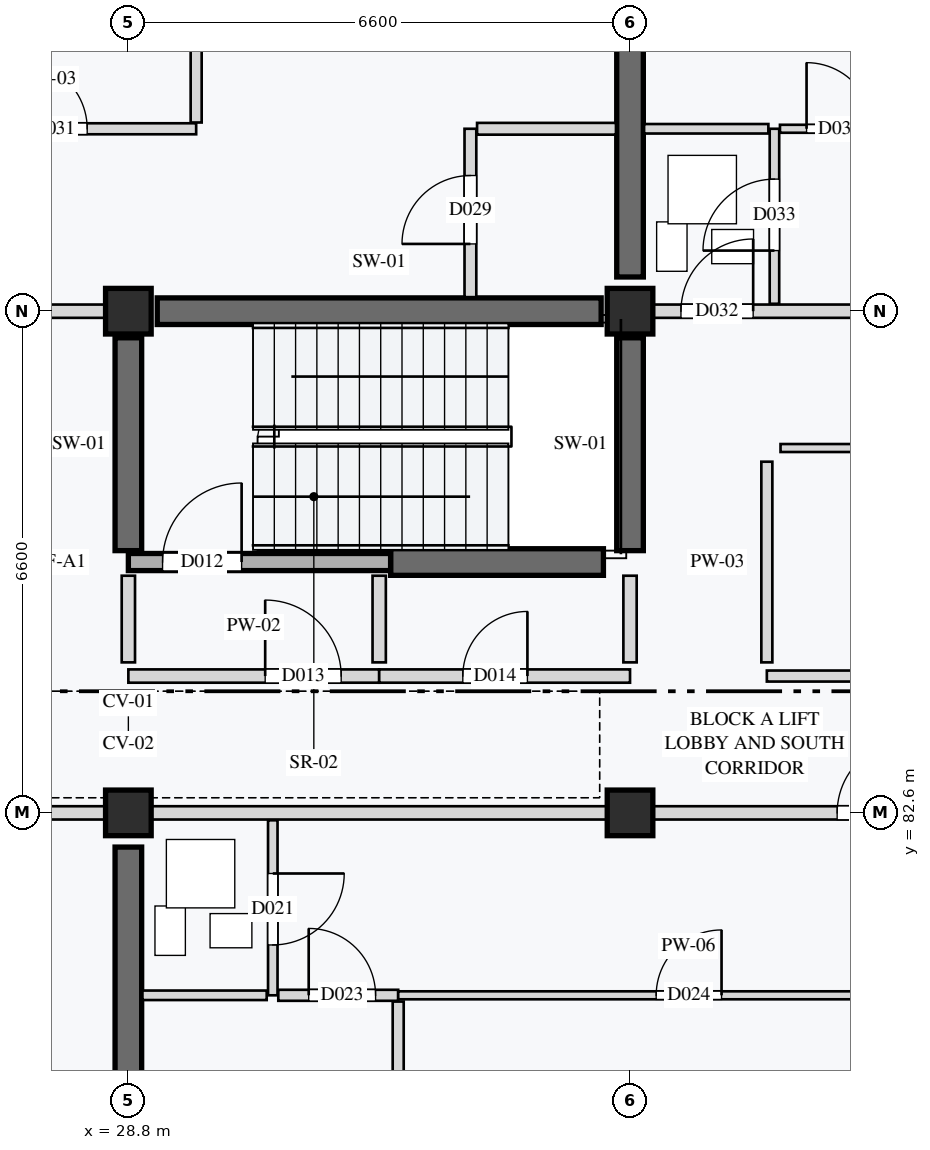
"""IFC4 building model, lengths in metres.
Left out: names, types, materials, properties, quantities, classifications, styles, units other than length and angle.
Written with IfcOpenShell. Run it as: python <this file> out.ifc"""

import sys

from ifc_helpers import new_model, si_unit, direction, frame, frame_2d, origin, origin_2d, place, context, subcontext, project, spatial, rectangle, extrude, element, fill, save


model = new_model("IFC4")
c1 = context("Model", 3, precision=1e-05, world=origin(), true_north=direction((0.0, 1.0)))
c2 = subcontext(c1, "Body", "Model", "MODEL_VIEW")
j1 = project(units=[si_unit("LENGTHUNIT", "METRE"), si_unit("PLANEANGLEUNIT", "RADIAN")], contexts=[c1])
p1 = place(None, origin())
s1 = spatial("IfcSite", under=j1, at=p1, CompositionType="ELEMENT")
p2 = place(p1, origin())
s2 = spatial("IfcBuilding", under=s1, at=p2, CompositionType="ELEMENT")
p3 = place(p2, origin())
s3 = spatial("IfcBuildingStorey", under=s2, at=p3, CompositionType="ELEMENT", Elevation=0.0)
for number, where, z_axis, x_axis in (
    (1, (28.8, 82.6, 0.0), (0.0, 0.0, 1.0), (1.0, 0.0, 0.0)),
    (2, (28.8, 89.2, 0.0), (0.0, 0.0, 1.0), (1.0, 0.0, 0.0)),
    (3, (35.4, 82.6, 0.0), (0.0, 0.0, 1.0), (1.0, 0.0, 0.0)),
    (4, (35.4, 89.2, 0.0), (0.0, 0.0, 1.0), (1.0, 0.0, 0.0)),
):
    element("IfcColumn", number, at=place(p3, frame(where, z_axis=z_axis, x_axis=x_axis)), inside=s3, PredefinedType="COLUMN", context=c2, shape_type="SweptSolid", body=[
        extrude(rectangle(XDim=0.6, YDim=0.6, at=origin_2d()), origin(), (0.0, 0.0, 1.0), 4.2),
    ])
p4 = place(p3, frame((29.18, 89.2, 0.0), z_axis=(0.0, 0.0, 1.0), x_axis=(1.0, 0.0, 0.0)))
e5 = element("IfcWall", 5, at=p4, inside=s3, PredefinedType="SHEAR", context=c2, shape_type="SweptSolid", body=[
    extrude(rectangle(XDim=5.84, YDim=0.35, at=frame_2d((2.92, 0.0))), origin(), (0.0, 0.0, 1.0), 3.92),
])
for number, where, z_axis, x_axis in (
    (6, (32.25, 85.9, 0.0), (0.0, 0.0, 1.0), (1.0, 0.0, 0.0)),
    (7, (28.8, 86.05, 0.0), (0.0, 0.0, 1.0), (0.0, 1.0, 0.0)),
    (8, (35.4, 86.05, 0.0), (0.0, 0.0, 1.0), (0.0, 1.0, 0.0)),
):
    element("IfcWall", number, at=place(p3, frame(where, z_axis=z_axis, x_axis=x_axis)), inside=s3, PredefinedType="SHEAR", context=c2, shape_type="SweptSolid", body=[
        extrude(rectangle(XDim=2.8, YDim=0.35, at=frame_2d((1.4, 0.0))), origin(), (0.0, 0.0, 1.0), 3.92),
    ])
p5 = place(p3, frame((28.8, 76.45, 0.0), z_axis=(0.0, 0.0, 1.0), x_axis=(0.0, 1.0, 0.0)))
e9 = element("IfcWall", 9, at=p5, inside=s3, PredefinedType="SHEAR", context=c2, shape_type="SweptSolid", body=[
    extrude(rectangle(XDim=5.7, YDim=0.35, at=frame_2d((2.85, 0.0))), origin(), (0.0, 0.0, 1.0), 3.92),
])
p6 = place(p3, frame((35.4, 89.65, 0.0), z_axis=(0.0, 0.0, 1.0), x_axis=(0.0, 1.0, 0.0)))
e10 = element("IfcWall", 10, at=p6, inside=s3, PredefinedType="SHEAR", context=c2, shape_type="SweptSolid", body=[
    extrude(rectangle(XDim=5.7, YDim=0.35, at=frame_2d((2.85, 0.0))), origin(), (0.0, 0.0, 1.0), 3.92),
])
p7 = place(p3, frame((28.8, 85.9, 0.0), z_axis=(0.0, 0.0, 1.0), x_axis=(1.0, 0.0, 0.0)))
e11 = element("IfcWall", 11, at=p7, inside=s3, PredefinedType="STANDARD", context=c2, shape_type="SweptSolid", body=[
    extrude(rectangle(XDim=3.45, YDim=0.225, at=frame_2d((1.725, 0.0))), origin(), (0.0, 0.0, 1.0), 3.92),
])
p8 = place(p7, frame((0.45, 0.0, 0.0)))
e12 = element("IfcOpeningElement", 12, at=p8, cuts=e11, PredefinedType="OPENING", context=c2, shape_type="SweptSolid", body=[
    extrude(rectangle(XDim=1.04, YDim=2.12, at=frame_2d((0.52, 1.06))), frame((0.0, 0.123, 0.0), z_axis=(0.0, -1.0, 0.0), x_axis=(1.0, 0.0, 0.0)), (0.0, 0.0, 1.0), 0.245),
])
p9 = place(p3, frame((28.8, 84.4, 0.0), z_axis=(0.0, 0.0, 1.0), x_axis=(1.0, 0.0, 0.0)))
e13 = element("IfcWall", 13, at=p9, inside=s3, PredefinedType="PARTITIONING", context=c2, shape_type="SweptSolid", body=[
    extrude(rectangle(XDim=3.3, YDim=0.175, at=frame_2d((1.65, 0.0))), origin(), (0.0, 0.0, 1.0), 3.92),
])
p10 = place(p9, frame((1.8, 0.0, 0.0)))
e14 = element("IfcOpeningElement", 14, at=p10, cuts=e13, PredefinedType="OPENING", context=c2, shape_type="SweptSolid", body=[
    extrude(rectangle(XDim=1.0, YDim=2.1, at=frame_2d((0.5, 1.05))), frame((0.0, 0.097, 0.0), z_axis=(0.0, -1.0, 0.0), x_axis=(1.0, 0.0, 0.0)), (0.0, 0.0, 1.0), 0.195),
])
p11 = place(p3, frame((32.1, 84.4, 0.0), z_axis=(0.0, 0.0, 1.0), x_axis=(1.0, 0.0, 0.0)))
e15 = element("IfcWall", 15, at=p11, inside=s3, PredefinedType="PARTITIONING", context=c2, shape_type="SweptSolid", body=[
    extrude(rectangle(XDim=3.3, YDim=0.175, at=frame_2d((1.65, 0.0))), origin(), (0.0, 0.0, 1.0), 3.92),
])
p12 = place(p11, frame((1.1, 0.0, 0.0)))
e16 = element("IfcOpeningElement", 16, at=p12, cuts=e15, PredefinedType="OPENING", context=c2, shape_type="SweptSolid", body=[
    extrude(rectangle(XDim=0.85, YDim=2.0, at=frame_2d((0.425, 1.0))), frame((0.0, 0.097, 0.0), z_axis=(0.0, -1.0, 0.0), x_axis=(1.0, 0.0, 0.0)), (0.0, 0.0, 1.0), 0.195),
])
p13 = place(p3, frame((28.8, 84.58, 0.0), z_axis=(0.0, 0.0, 1.0), x_axis=(0.0, 1.0, 0.0)))
e17 = element("IfcWall", 17, at=p13, inside=s3, PredefinedType="PARTITIONING", context=c2, shape_type="SweptSolid", body=[
    extrude(rectangle(XDim=1.14, YDim=0.175, at=frame_2d((0.57, 0.0))), origin(), (0.0, 0.0, 1.0), 3.75),
])
for number, where, z_axis, x_axis in (
    (18, (32.1, 84.58, 0.0), (0.0, 0.0, 1.0), (0.0, 1.0, 0.0)),
    (19, (35.4, 84.58, 0.0), (0.0, 0.0, 1.0), (0.0, 1.0, 0.0)),
):
    element("IfcWall", number, at=place(p3, frame(where, z_axis=z_axis, x_axis=x_axis)), inside=s3, PredefinedType="PARTITIONING", context=c2, shape_type="SweptSolid", body=[
        extrude(rectangle(XDim=1.14, YDim=0.175, at=frame_2d((0.57, 0.0))), origin(), (0.0, 0.0, 1.0), 3.92),
    ])
p14 = place(p3, frame((37.2, 84.4, 0.0), z_axis=(0.0, 0.0, 1.0), x_axis=(1.0, 0.0, 0.0)))
e20 = element("IfcWall", 20, at=p14, inside=s3, PredefinedType="PARTITIONING", context=c2, shape_type="SweptSolid", body=[
    extrude(rectangle(XDim=6.0, YDim=0.145, at=frame_2d((3.0, 0.0))), origin(), (0.0, 0.0, 1.0), 3.92),
])
p15 = place(p14, frame((1.6, 0.0, 0.0)))
e21 = element("IfcOpeningElement", 21, at=p15, cuts=e20, PredefinedType="OPENING", context=c2, shape_type="SweptSolid", body=[
    extrude(rectangle(XDim=0.87, YDim=2.08, at=frame_2d((0.435, 1.04))), frame((0.0, 0.083, 0.0), z_axis=(0.0, -1.0, 0.0), x_axis=(1.0, 0.0, 0.0)), (0.0, 0.0, 1.0), 0.165),
])
p16 = place(p3, frame((37.38, 87.4, 0.0), z_axis=(0.0, 0.0, 1.0), x_axis=(1.0, 0.0, 0.0)))
e22 = element("IfcWall", 22, at=p16, inside=s3, PredefinedType="PARTITIONING", context=c2, shape_type="SweptSolid", body=[
    extrude(rectangle(XDim=11.2, YDim=0.105, at=frame_2d((5.6, 0.0))), origin(), (0.0, 0.0, 1.0), 3.92),
])
p17 = place(p3, frame((37.2, 84.58, 0.0), z_axis=(0.0, 0.0, 1.0), x_axis=(0.0, 1.0, 0.0)))
e23 = element("IfcWall", 23, at=p17, inside=s3, PredefinedType="PARTITIONING", context=c2, shape_type="SweptSolid", body=[
    extrude(rectangle(XDim=2.64, YDim=0.145, at=frame_2d((1.32, 0.0))), origin(), (0.0, 0.0, 1.0), 3.92),
])
p18 = place(p3, frame((22.2, 82.6, 0.0), z_axis=(0.0, 0.0, 1.0), x_axis=(1.0, 0.0, 0.0)))
e24 = element("IfcWall", 24, at=p18, inside=s3, PredefinedType="PARTITIONING", context=c2, shape_type="SweptSolid", body=[
    extrude(rectangle(XDim=6.6, YDim=0.175, at=frame_2d((3.3, 0.0))), origin(), (0.0, 0.0, 1.0), 3.55),
])
p19 = place(p18, frame((2.4, 0.0, 0.0)))
e25 = element("IfcOpeningElement", 25, at=p19, cuts=e24, PredefinedType="OPENING", context=c2, shape_type="SweptSolid", body=[
    extrude(rectangle(XDim=1.6, YDim=2.2, at=frame_2d((0.8, 1.1))), frame((0.0, 0.097, 0.0), z_axis=(0.0, -1.0, 0.0), x_axis=(1.0, 0.0, 0.0)), (0.0, 0.0, 1.0), 0.195),
])
p20 = place(p3, frame((28.8, 82.6, 0.0), z_axis=(0.0, 0.0, 1.0), x_axis=(1.0, 0.0, 0.0)))
e26 = element("IfcWall", 26, at=p20, inside=s3, PredefinedType="PARTITIONING", context=c2, shape_type="SweptSolid", body=[
    extrude(rectangle(XDim=19.8, YDim=0.175, at=frame_2d((9.9, 0.0))), origin(), (0.0, 0.0, 1.0), 3.55),
])
p21 = place(p20, frame((9.325, 0.0, 0.0)))
e27 = element("IfcOpeningElement", 27, at=p21, cuts=e26, PredefinedType="OPENING", context=c2, shape_type="SweptSolid", body=[
    extrude(rectangle(XDim=0.95, YDim=2.1, at=frame_2d((0.475, 1.05))), frame((0.0, 0.097, 0.0), z_axis=(0.0, -1.0, 0.0), x_axis=(1.0, 0.0, 0.0)), (0.0, 0.0, 1.0), 0.195),
])
p22 = place(p3, frame((30.7, 82.502, 0.0), z_axis=(0.0, 0.0, 1.0), x_axis=(0.0, -1.0, 0.0)))
e28 = element("IfcWall", 28, at=p22, inside=s3, PredefinedType="PARTITIONING", context=c2, shape_type="SweptSolid", body=[
    extrude(rectangle(XDim=2.302, YDim=0.125, at=frame_2d((1.151, 0.0))), origin(), (0.0, 0.0, 1.0), 3.92),
])
p23 = place(p22, frame((0.7, 0.0, 0.0)))
e29 = element("IfcOpeningElement", 29, at=p23, cuts=e28, PredefinedType="OPENING", context=c2, shape_type="SweptSolid", body=[
    extrude(rectangle(XDim=0.94, YDim=2.08, at=frame_2d((0.47, 1.04))), frame((0.0, 0.073, 0.0), z_axis=(0.0, -1.0, 0.0), x_axis=(1.0, 0.0, 0.0)), (0.0, 0.0, 1.0), 0.145),
])
p24 = place(p3, frame((28.985, 80.2, 0.0), z_axis=(0.0, 0.0, 1.0), x_axis=(1.0, 0.0, 0.0)))
e30 = element("IfcWall", 30, at=p24, inside=s3, PredefinedType="PARTITIONING", context=c2, shape_type="SweptSolid", body=[
    extrude(rectangle(XDim=1.635, YDim=0.125, at=frame_2d((0.817, 0.0))), origin(), (0.0, 0.0, 1.0), 3.92),
])
p25 = place(p3, frame((30.772, 80.2, 0.0), z_axis=(0.0, 0.0, 1.0), x_axis=(1.0, 0.0, 0.0)))
e31 = element("IfcWall", 31, at=p25, inside=s3, PredefinedType="PARTITIONING", context=c2, shape_type="SweptSolid", body=[
    extrude(rectangle(XDim=1.578, YDim=0.145, at=frame_2d((0.789, 0.0))), origin(), (0.0, 0.0, 1.0), 3.92),
])
p26 = place(p25, frame((0.4, 0.0, 0.0)))
e32 = element("IfcOpeningElement", 32, at=p26, cuts=e31, PredefinedType="OPENING", context=c2, shape_type="SweptSolid", body=[
    extrude(rectangle(XDim=0.88, YDim=2.16, at=frame_2d((0.44, 1.08))), frame((0.0, 0.083, 0.0), z_axis=(0.0, -1.0, 0.0), x_axis=(1.0, 0.0, 0.0)), (0.0, 0.0, 1.0), 0.165),
])
p27 = place(p3, frame((32.35, 80.117, 0.0), z_axis=(0.0, 0.0, 1.0), x_axis=(0.0, -1.0, 0.0)))
e33 = element("IfcWall", 33, at=p27, inside=s3, PredefinedType="PARTITIONING", context=c2, shape_type="SweptSolid", body=[
    extrude(rectangle(XDim=3.938, YDim=0.145, at=frame_2d((1.969, 0.0))), origin(), (0.0, 0.0, 1.0), 3.92),
])
p28 = place(p3, frame((32.35, 80.2, 0.0), z_axis=(0.0, 0.0, 1.0), x_axis=(1.0, 0.0, 0.0)))
e34 = element("IfcWall", 34, at=p28, inside=s3, PredefinedType="PARTITIONING", context=c2, shape_type="SweptSolid", body=[
    extrude(rectangle(XDim=7.638, YDim=0.105, at=frame_2d((3.819, 0.0))), origin(), (0.0, 0.0, 1.0), 3.92),
])
p29 = place(p28, frame((3.394, 0.0, 0.0)))
e35 = element("IfcOpeningElement", 35, at=p29, cuts=e34, PredefinedType="OPENING", context=c2, shape_type="SweptSolid", body=[
    extrude(rectangle(XDim=0.86, YDim=2.12, at=frame_2d((0.43, 1.06))), frame((0.0, 0.062, 0.0), z_axis=(0.0, -1.0, 0.0), x_axis=(1.0, 0.0, 0.0)), (0.0, 0.0, 1.0), 0.125),
])
p30 = place(p3, frame((22.2, 89.2, 0.0), z_axis=(0.0, 0.0, 1.0), x_axis=(1.0, 0.0, 0.0)))
e36 = element("IfcWall", 36, at=p30, inside=s3, PredefinedType="PARTITIONING", context=c2, shape_type="SweptSolid", body=[
    extrude(rectangle(XDim=6.6, YDim=0.175, at=frame_2d((3.3, 0.0))), origin(), (0.0, 0.0, 1.0), 3.55),
])
p31 = place(p30, frame((3.85, 0.0, 0.0)))
e37 = element("IfcOpeningElement", 37, at=p31, cuts=e36, PredefinedType="OPENING", context=c2, shape_type="SweptSolid", body=[
    extrude(rectangle(XDim=0.96, YDim=2.18, at=frame_2d((0.48, 1.09))), frame((0.0, 0.097, 0.0), z_axis=(0.0, -1.0, 0.0), x_axis=(1.0, 0.0, 0.0)), (0.0, 0.0, 1.0), 0.195),
])
p32 = place(p3, frame((33.3, 89.385, 0.0), z_axis=(0.0, 0.0, 1.0), x_axis=(0.0, 1.0, 0.0)))
e38 = element("IfcWall", 38, at=p32, inside=s3, PredefinedType="PARTITIONING", context=c2, shape_type="SweptSolid", body=[
    extrude(rectangle(XDim=2.215, YDim=0.155, at=frame_2d((1.107, 0.0))), origin(), (0.0, 0.0, 1.0), 3.92),
])
p33 = place(p32, frame((0.7, 0.0, 0.0)))
e39 = element("IfcOpeningElement", 39, at=p33, cuts=e38, PredefinedType="OPENING", context=c2, shape_type="SweptSolid", body=[
    extrude(rectangle(XDim=0.9, YDim=2.16, at=frame_2d((0.45, 1.08))), frame((0.0, 0.087, 0.0), z_axis=(0.0, -1.0, 0.0), x_axis=(1.0, 0.0, 0.0)), (0.0, 0.0, 1.0), 0.175),
])
p34 = place(p3, frame((33.387, 91.6, 0.0), z_axis=(0.0, 0.0, 1.0), x_axis=(1.0, 0.0, 0.0)))
e40 = element("IfcWall", 40, at=p34, inside=s3, PredefinedType="PARTITIONING", context=c2, shape_type="SweptSolid", body=[
    extrude(rectangle(XDim=1.828, YDim=0.155, at=frame_2d((0.914, 0.0))), origin(), (0.0, 0.0, 1.0), 3.92),
])
p35 = place(p3, frame((25.833, 91.6, 0.0), z_axis=(0.0, 0.0, 1.0), x_axis=(1.0, 0.0, 0.0)))
e41 = element("IfcWall", 41, at=p35, inside=s3, PredefinedType="PARTITIONING", context=c2, shape_type="SweptSolid", body=[
    extrude(rectangle(XDim=3.859, YDim=0.145, at=frame_2d((1.93, 0.0))), origin(), (0.0, 0.0, 1.0), 3.92),
])
p36 = place(p35, frame((1.546, 0.0, 0.0)))
e42 = element("IfcOpeningElement", 42, at=p36, cuts=e41, PredefinedType="OPENING", context=c2, shape_type="SweptSolid", body=[
    extrude(rectangle(XDim=0.88, YDim=2.1, at=frame_2d((0.44, 1.05))), frame((0.0, 0.083, 0.0), z_axis=(0.0, -1.0, 0.0), x_axis=(1.0, 0.0, 0.0)), (0.0, 0.0, 1.0), 0.165),
])
p37 = place(p3, frame((29.692, 91.683, 0.0), z_axis=(0.0, 0.0, 1.0), x_axis=(0.0, 1.0, 0.0)))
e43 = element("IfcWall", 43, at=p37, inside=s3, PredefinedType="PARTITIONING", context=c2, shape_type="SweptSolid", body=[
    extrude(rectangle(XDim=3.938, YDim=0.145, at=frame_2d((1.969, 0.0))), origin(), (0.0, 0.0, 1.0), 3.92),
])
p38 = place(p3, frame((35.4, 89.2, 0.0), z_axis=(0.0, 0.0, 1.0), x_axis=(1.0, 0.0, 0.0)))
e44 = element("IfcWall", 44, at=p38, inside=s3, PredefinedType="PARTITIONING", context=c2, shape_type="SweptSolid", body=[
    extrude(rectangle(XDim=13.2, YDim=0.175, at=frame_2d((6.6, 0.0))), origin(), (0.0, 0.0, 1.0), 3.55),
])
p39 = place(p38, frame((0.67, 0.0, 0.0)))
e45 = element("IfcOpeningElement", 45, at=p39, cuts=e44, PredefinedType="OPENING", context=c2, shape_type="SweptSolid", body=[
    extrude(rectangle(XDim=0.95, YDim=2.1, at=frame_2d((0.475, 1.05))), frame((0.0, 0.097, 0.0), z_axis=(0.0, -1.0, 0.0), x_axis=(1.0, 0.0, 0.0)), (0.0, 0.0, 1.0), 0.195),
])
p40 = place(p3, frame((37.3, 89.298, 0.0), z_axis=(0.0, 0.0, 1.0), x_axis=(0.0, 1.0, 0.0)))
e46 = element("IfcWall", 46, at=p40, inside=s3, PredefinedType="PARTITIONING", context=c2, shape_type="SweptSolid", body=[
    extrude(rectangle(XDim=2.302, YDim=0.125, at=frame_2d((1.151, 0.0))), origin(), (0.0, 0.0, 1.0), 3.92),
])
p41 = place(p40, frame((0.7, 0.0, 0.0)))
e47 = element("IfcOpeningElement", 47, at=p41, cuts=e46, PredefinedType="OPENING", context=c2, shape_type="SweptSolid", body=[
    extrude(rectangle(XDim=0.94, YDim=2.08, at=frame_2d((0.47, 1.04))), frame((0.0, 0.073, 0.0), z_axis=(0.0, -1.0, 0.0), x_axis=(1.0, 0.0, 0.0)), (0.0, 0.0, 1.0), 0.145),
])
p42 = place(p3, frame((35.585, 91.6, 0.0), z_axis=(0.0, 0.0, 1.0), x_axis=(1.0, 0.0, 0.0)))
e48 = element("IfcWall", 48, at=p42, inside=s3, PredefinedType="PARTITIONING", context=c2, shape_type="SweptSolid", body=[
    extrude(rectangle(XDim=1.635, YDim=0.125, at=frame_2d((0.817, 0.0))), origin(), (0.0, 0.0, 1.0), 3.92),
])
p43 = place(p3, frame((37.373, 91.6, 0.0), z_axis=(0.0, 0.0, 1.0), x_axis=(1.0, 0.0, 0.0)))
e49 = element("IfcWall", 49, at=p43, inside=s3, PredefinedType="PARTITIONING", context=c2, shape_type="SweptSolid", body=[
    extrude(rectangle(XDim=1.478, YDim=0.105, at=frame_2d((0.739, 0.0))), origin(), (0.0, 0.0, 1.0), 3.92),
])
p44 = place(p43, frame((0.35, 0.0, 0.0)))
e50 = element("IfcOpeningElement", 50, at=p44, cuts=e49, PredefinedType="OPENING", context=c2, shape_type="SweptSolid", body=[
    extrude(rectangle(XDim=0.87, YDim=2.08, at=frame_2d((0.435, 1.04))), frame((0.0, 0.062, 0.0), z_axis=(0.0, -1.0, 0.0), x_axis=(1.0, 0.0, 0.0)), (0.0, 0.0, 1.0), 0.125),
])
p45 = place(p8, origin())
e51 = element("IfcDoor", 51, at=p45, inside=s3, OperationType="SINGLE_SWING_RIGHT", PredefinedType="DOOR", context=c2, shape_type="SweptSolid", body=[
    extrude(rectangle(XDim=1.04, YDim=2.12, at=frame_2d((0.52, 1.06))), frame((0.0, 0.025, 0.0), z_axis=(0.0, -1.0, 0.0), x_axis=(1.0, 0.0, 0.0)), (0.0, 0.0, 1.0), 0.05),
])
fill(e12, e51)
p46 = place(p10, origin())
e52 = element("IfcDoor", 52, at=p46, inside=s3, OperationType="SINGLE_SWING_LEFT", PredefinedType="DOOR", context=c2, shape_type="SweptSolid", body=[
    extrude(rectangle(XDim=1.0, YDim=2.1, at=frame_2d((0.5, 1.05))), frame((0.0, 0.025, 0.0), z_axis=(0.0, -1.0, 0.0), x_axis=(1.0, 0.0, 0.0)), (0.0, 0.0, 1.0), 0.05),
])
fill(e14, e52)
p47 = place(p12, origin())
e53 = element("IfcDoor", 53, at=p47, inside=s3, OperationType="SINGLE_SWING_RIGHT", PredefinedType="DOOR", context=c2, shape_type="SweptSolid", body=[
    extrude(rectangle(XDim=0.85, YDim=2.0, at=frame_2d((0.425, 1.0))), frame((0.0, 0.025, 0.0), z_axis=(0.0, -1.0, 0.0), x_axis=(1.0, 0.0, 0.0)), (0.0, 0.0, 1.0), 0.05),
])
fill(e16, e53)
p48 = place(p21, origin())
e54 = element("IfcDoor", 54, at=p48, inside=s3, OperationType="SINGLE_SWING_RIGHT", PredefinedType="DOOR", context=c2, shape_type="SweptSolid", body=[
    extrude(rectangle(XDim=0.95, YDim=2.1, at=frame_2d((0.475, 1.05))), frame((0.0, 0.025, 0.0), z_axis=(0.0, -1.0, 0.0), x_axis=(1.0, 0.0, 0.0)), (0.0, 0.0, 1.0), 0.05),
])
fill(e27, e54)
p49 = place(p23, origin())
e55 = element("IfcDoor", 55, at=p49, inside=s3, OperationType="SINGLE_SWING_LEFT", PredefinedType="DOOR", context=c2, shape_type="SweptSolid", body=[
    extrude(rectangle(XDim=0.94, YDim=2.08, at=frame_2d((0.47, 1.04))), frame((0.0, 0.025, 0.0), z_axis=(0.0, -1.0, 0.0), x_axis=(1.0, 0.0, 0.0)), (0.0, 0.0, 1.0), 0.05),
])
fill(e29, e55)
p50 = place(p26, origin())
e56 = element("IfcDoor", 56, at=p50, inside=s3, OperationType="SINGLE_SWING_LEFT", PredefinedType="DOOR", context=c2, shape_type="SweptSolid", body=[
    extrude(rectangle(XDim=0.88, YDim=2.16, at=frame_2d((0.44, 1.08))), frame((0.0, 0.025, 0.0), z_axis=(0.0, -1.0, 0.0), x_axis=(1.0, 0.0, 0.0)), (0.0, 0.0, 1.0), 0.05),
])
fill(e32, e56)
p51 = place(p29, origin())
e57 = element("IfcDoor", 57, at=p51, inside=s3, OperationType="SINGLE_SWING_RIGHT", PredefinedType="DOOR", context=c2, shape_type="SweptSolid", body=[
    extrude(rectangle(XDim=0.86, YDim=2.12, at=frame_2d((0.43, 1.06))), frame((0.0, 0.025, 0.0), z_axis=(0.0, -1.0, 0.0), x_axis=(1.0, 0.0, 0.0)), (0.0, 0.0, 1.0), 0.05),
])
fill(e35, e57)
p52 = place(p33, origin())
e58 = element("IfcDoor", 58, at=p52, inside=s3, OperationType="SINGLE_SWING_LEFT", PredefinedType="DOOR", context=c2, shape_type="SweptSolid", body=[
    extrude(rectangle(XDim=0.9, YDim=2.16, at=frame_2d((0.45, 1.08))), frame((0.0, 0.025, 0.0), z_axis=(0.0, -1.0, 0.0), x_axis=(1.0, 0.0, 0.0)), (0.0, 0.0, 1.0), 0.05),
])
fill(e39, e58)
p53 = place(p36, origin())
e59 = element("IfcDoor", 59, at=p53, inside=s3, OperationType="SINGLE_SWING_LEFT", PredefinedType="DOOR", context=c2, shape_type="SweptSolid", body=[
    extrude(rectangle(XDim=0.88, YDim=2.1, at=frame_2d((0.44, 1.05))), frame((0.0, 0.025, 0.0), z_axis=(0.0, -1.0, 0.0), x_axis=(1.0, 0.0, 0.0)), (0.0, 0.0, 1.0), 0.05),
])
fill(e42, e59)
p54 = place(p39, origin())
e60 = element("IfcDoor", 60, at=p54, inside=s3, OperationType="SINGLE_SWING_RIGHT", PredefinedType="DOOR", context=c2, shape_type="SweptSolid", body=[
    extrude(rectangle(XDim=0.95, YDim=2.1, at=frame_2d((0.475, 1.05))), frame((0.0, 0.025, 0.0), z_axis=(0.0, -1.0, 0.0), x_axis=(1.0, 0.0, 0.0)), (0.0, 0.0, 1.0), 0.05),
])
fill(e45, e60)
p55 = place(p41, origin())
e61 = element("IfcDoor", 61, at=p55, inside=s3, OperationType="SINGLE_SWING_LEFT", PredefinedType="DOOR", context=c2, shape_type="SweptSolid", body=[
    extrude(rectangle(XDim=0.94, YDim=2.08, at=frame_2d((0.47, 1.04))), frame((0.0, 0.025, 0.0), z_axis=(0.0, -1.0, 0.0), x_axis=(1.0, 0.0, 0.0)), (0.0, 0.0, 1.0), 0.05),
])
fill(e47, e61)
p56 = place(p44, origin())
e62 = element("IfcDoor", 62, at=p56, inside=s3, OperationType="SINGLE_SWING_LEFT", PredefinedType="DOOR", context=c2, shape_type="SweptSolid", body=[
    extrude(rectangle(XDim=0.87, YDim=2.08, at=frame_2d((0.435, 1.04))), frame((0.0, 0.025, 0.0), z_axis=(0.0, -1.0, 0.0), x_axis=(1.0, 0.0, 0.0)), (0.0, 0.0, 1.0), 0.05),
])
fill(e50, e62)
save(model, sys.argv[1])
